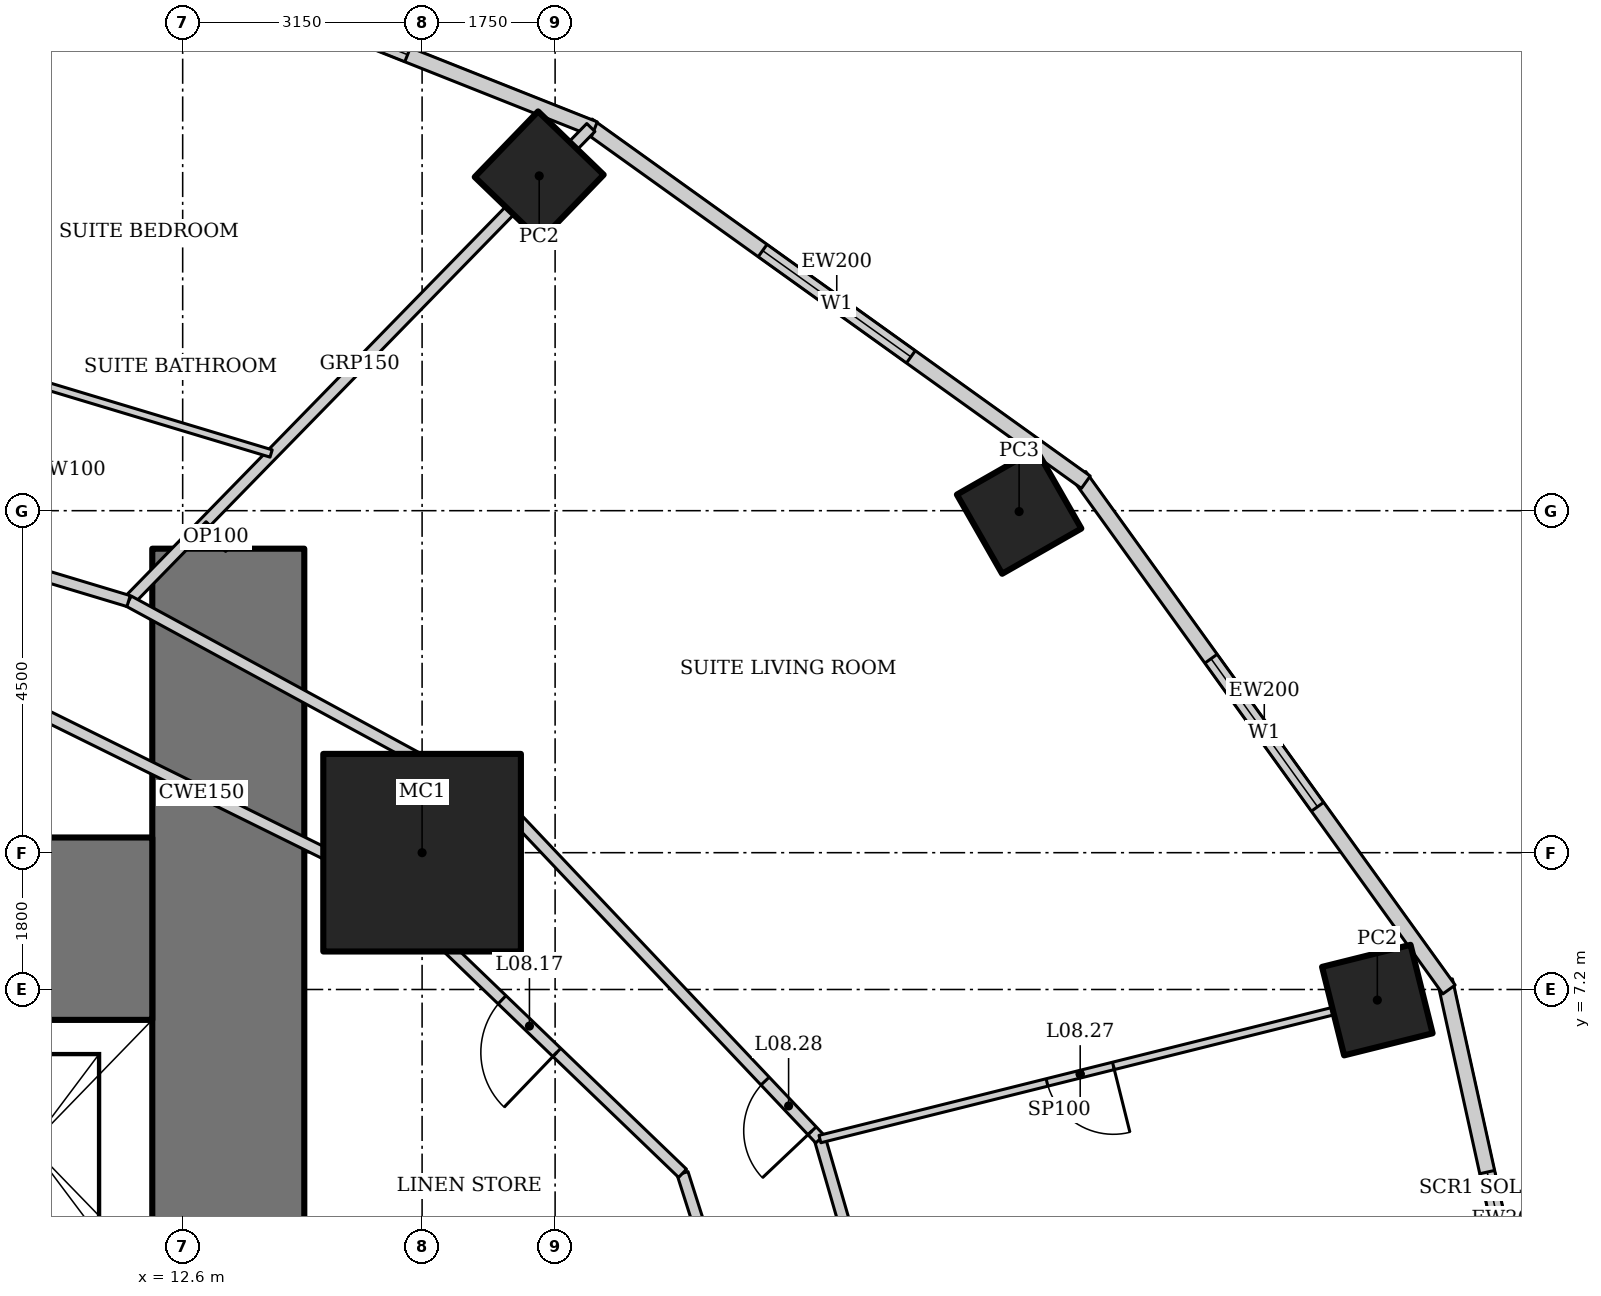
"""IFC4 building model, lengths in metres.
Left out: names, types, materials, properties, quantities, classifications, styles, units other than length and angle.
Written with IfcOpenShell. Run it as: python <this file> out.ifc"""

import sys

from ifc_helpers import new_model, si_unit, direction, frame, frame_2d, origin, origin_2d, place, context, subcontext, project, spatial, rectangle, hollow_rectangle, extrude, element, fill, save


model = new_model("IFC4")
c1 = context("Model", 3, precision=1e-05, world=origin(), true_north=direction((0.0, 1.0)))
c2 = subcontext(c1, "Body", "Model", "MODEL_VIEW")
j1 = project(units=[si_unit("LENGTHUNIT", "METRE"), si_unit("PLANEANGLEUNIT", "RADIAN")], contexts=[c1])
p1 = place(None, origin())
s1 = spatial("IfcSite", under=j1, at=p1, CompositionType="ELEMENT")
p2 = place(p1, origin())
s2 = spatial("IfcBuilding", under=s1, at=p2, CompositionType="ELEMENT")
p3 = place(p2, frame((0.0, 0.0, 44.2)))
s3 = spatial("IfcBuildingStorey", under=s2, at=p3, CompositionType="ELEMENT", Elevation=44.2)
p4 = place(p3, frame((15.75, 9.0, 0.0), z_axis=(0.0, 0.0, 1.0), x_axis=(1.0, 0.0, 0.0)))
e1 = element("IfcColumn", 1, at=p4, inside=s3, PredefinedType="COLUMN", context=c2, shape_type="SweptSolid", body=[
    extrude(hollow_rectangle(XDim=2.6, YDim=2.6, WallThickness=0.13, at=origin_2d()), origin(), (0.0, 0.0, 1.0), 3.6),
])
p5 = place(p3, frame((28.318, 7.06, 0.0), z_axis=(0.0, 0.0, 1.0), x_axis=(0.970295726276, 0.2419218956, 0.0)))
e2 = element("IfcColumn", 2, at=p5, inside=s3, PredefinedType="COLUMN", context=c2, shape_type="SweptSolid", body=[
    extrude(hollow_rectangle(XDim=1.2, YDim=1.2, WallThickness=0.1, at=origin_2d()), origin(), (0.0, 0.0, 1.0), 3.6),
])
p6 = place(p3, frame((23.605, 13.489, 0.0), z_axis=(0.0, 0.0, 1.0), x_axis=(0.86824298017, 0.496139221777, 0.0)))
e3 = element("IfcColumn", 3, at=p6, inside=s3, PredefinedType="COLUMN", context=c2, shape_type="SweptSolid", body=[
    extrude(hollow_rectangle(XDim=1.2, YDim=1.2, WallThickness=0.12, at=origin_2d()), origin(), (0.0, 0.0, 1.0), 3.6),
])
p7 = place(p3, frame((17.291, 17.905, 0.0), z_axis=(0.0, 0.0, 1.0), x_axis=(0.694658370459, 0.719339800339, 0.0)))
e4 = element("IfcColumn", 4, at=p7, inside=s3, PredefinedType="COLUMN", context=c2, shape_type="SweptSolid", body=[
    extrude(hollow_rectangle(XDim=1.2, YDim=1.2, WallThickness=0.1, at=origin_2d()), origin(), (0.0, 0.0, 1.0), 3.6),
])
p8 = place(p3, frame((13.2, -13.0, 0.0), z_axis=(0.0, 0.0, 1.0), x_axis=(0.0, 1.0, 0.0)))
e5 = element("IfcWall", 5, at=p8, inside=s3, PredefinedType="SHEAR", context=c2, shape_type="SweptSolid", body=[
    extrude(rectangle(XDim=26.0, YDim=2.0, at=frame_2d((13.0, 0.0))), origin(), (0.0, 0.0, 1.0), 3.6),
])
p9 = place(p8, frame((12.1, 0.0, 0.0)))
e6 = element("IfcOpeningElement", 6, at=p9, cuts=e5, PredefinedType="OPENING", context=c2, shape_type="SweptSolid", body=[
    extrude(rectangle(XDim=1.8, YDim=2.1, at=frame_2d((0.9, 1.05))), frame((0.0, 1.01, 0.0), z_axis=(0.0, -1.0, 0.0), x_axis=(1.0, 0.0, 0.0)), (0.0, 0.0, 1.0), 2.02),
])
p10 = place(p3, frame((12.2, 8.0, 0.0), z_axis=(0.0, 0.0, 1.0), x_axis=(-1.0, 0.0, 0.0)))
e7 = element("IfcWall", 7, at=p10, inside=s3, PredefinedType="SHEAR", context=c2, shape_type="SweptSolid", body=[
    extrude(rectangle(XDim=24.4, YDim=2.4, at=frame_2d((12.2, 0.0))), origin(), (0.0, 0.0, 1.0), 3.6),
])
p11 = place(p3, frame((30.835, -0.067, 0.0), z_axis=(0.0, 0.0, 1.0), x_axis=(-0.215238065514, 0.976561608478, 0.0)))
e8 = element("IfcWall", 8, at=p11, inside=s3, PredefinedType="SOLIDWALL", context=c2, shape_type="SweptSolid", body=[
    extrude(rectangle(XDim=7.562, YDim=0.2, at=frame_2d((3.781, 0.0))), origin(), (0.0, 0.0, 1.0), 3.45),
])
p12 = place(p11, frame((2.581, 0.0, 0.5)))
e9 = element("IfcOpeningElement", 9, at=p12, cuts=e8, PredefinedType="OPENING", context=c2, shape_type="SweptSolid", body=[
    extrude(rectangle(XDim=2.4, YDim=2.2, at=frame_2d((1.2, 1.1))), frame((0.0, 0.11, 0.0), z_axis=(0.0, -1.0, 0.0), x_axis=(1.0, 0.0, 0.0)), (0.0, 0.0, 1.0), 0.22),
])
p13 = place(p3, frame((29.26, 7.2, 0.0), z_axis=(0.0, 0.0, 1.0), x_axis=(-0.583937613703, 0.811798536155, 0.0)))
e10 = element("IfcWall", 10, at=p13, inside=s3, PredefinedType="SOLIDWALL", context=c2, shape_type="SweptSolid", body=[
    extrude(rectangle(XDim=8.323, YDim=0.2, at=frame_2d((4.162, 0.0))), origin(), (0.0, 0.0, 1.0), 3.45),
])
p14 = place(p13, frame((2.961, 0.0, 0.5)))
e11 = element("IfcOpeningElement", 11, at=p14, cuts=e10, PredefinedType="OPENING", context=c2, shape_type="SweptSolid", body=[
    extrude(rectangle(XDim=2.4, YDim=2.2, at=frame_2d((1.2, 1.1))), frame((0.0, 0.11, 0.0), z_axis=(0.0, -1.0, 0.0), x_axis=(1.0, 0.0, 0.0)), (0.0, 0.0, 1.0), 0.22),
])
p15 = place(p3, frame((24.482, 13.875, 0.0), z_axis=(0.0, 0.0, 1.0), x_axis=(-0.812791321576, 0.582554948112, 0.0)))
e12 = element("IfcWall", 12, at=p15, inside=s3, PredefinedType="SOLIDWALL", context=c2, shape_type="SweptSolid", body=[
    extrude(rectangle(XDim=8.063, YDim=0.2, at=frame_2d((4.032, 0.0))), origin(), (0.0, 0.0, 1.0), 3.45),
])
p16 = place(p15, frame((2.832, 0.0, 0.5)))
e13 = element("IfcOpeningElement", 13, at=p16, cuts=e12, PredefinedType="OPENING", context=c2, shape_type="SweptSolid", body=[
    extrude(rectangle(XDim=2.4, YDim=2.2, at=frame_2d((1.2, 1.1))), frame((0.0, 0.11, 0.0), z_axis=(0.0, -1.0, 0.0), x_axis=(1.0, 0.0, 0.0)), (0.0, 0.0, 1.0), 0.22),
])
p17 = place(p3, frame((18.018, 18.523, 0.0), z_axis=(0.0, 0.0, 1.0), x_axis=(-0.929358351251, 0.369178892895, 0.0)))
e14 = element("IfcWall", 14, at=p17, inside=s3, PredefinedType="SOLIDWALL", context=c2, shape_type="SweptSolid", body=[
    extrude(rectangle(XDim=7.692, YDim=0.2, at=frame_2d((3.846, 0.0))), origin(), (0.0, 0.0, 1.0), 3.45),
])
p18 = place(p17, frame((2.646, 0.0, 0.5)))
e15 = element("IfcOpeningElement", 15, at=p18, cuts=e14, PredefinedType="OPENING", context=c2, shape_type="SweptSolid", body=[
    extrude(rectangle(XDim=2.4, YDim=2.2, at=frame_2d((1.2, 1.1))), frame((0.0, 0.11, 0.0), z_axis=(0.0, -1.0, 0.0), x_axis=(1.0, 0.0, 0.0)), (0.0, 0.0, 1.0), 0.22),
])
p19 = place(p3, frame((17.97, 18.542, 0.0), z_axis=(0.0, 0.0, 1.0), x_axis=(-0.698503223934, -0.715606907564, 0.0)))
e16 = element("IfcWall", 16, at=p19, inside=s3, PredefinedType="PARTITIONING", context=c2, shape_type="SweptSolid", body=[
    extrude(rectangle(XDim=8.707, YDim=0.15, at=frame_2d((4.354, 0.0))), origin(), (0.0, 0.0, 1.0), 2.528),
])
p20 = place(p3, frame((22.5, 0.0, 0.0), z_axis=(0.0, 0.0, 1.0), x_axis=(-0.278247435376, 0.960509429785, 0.0)))
e17 = element("IfcWall", 17, at=p20, inside=s3, PredefinedType="PARTITIONING", context=c2, shape_type="SweptSolid", body=[
    extrude(rectangle(XDim=5.447, YDim=0.15, at=frame_2d((2.724, 0.0))), origin(), (0.0, 0.0, 1.0), 3.45),
])
p21 = place(p3, frame((20.984, 5.232, 0.0), z_axis=(0.0, 0.0, 1.0), x_axis=(-0.687062608696, 0.726598218916, 0.0)))
e18 = element("IfcWall", 18, at=p21, inside=s3, PredefinedType="PARTITIONING", context=c2, shape_type="SweptSolid", body=[
    extrude(rectangle(XDim=6.039, YDim=0.15, at=frame_2d((3.02, 0.0))), origin(), (0.0, 0.0, 1.0), 3.45),
])
p22 = place(p21, frame((0.15, 0.0, 0.0)))
e19 = element("IfcOpeningElement", 19, at=p22, cuts=e18, PredefinedType="OPENING", context=c2, shape_type="SweptSolid", body=[
    extrude(rectangle(XDim=0.9, YDim=2.1, at=frame_2d((0.45, 1.05))), frame((0.0, 0.085, 0.0), z_axis=(0.0, -1.0, 0.0), x_axis=(1.0, 0.0, 0.0)), (0.0, 0.0, 1.0), 0.17),
])
p23 = place(p3, frame((16.835, 9.62, 0.0), z_axis=(0.0, 0.0, 1.0), x_axis=(-0.878450059298, 0.477834169267, 0.0)))
e20 = element("IfcWall", 20, at=p23, inside=s3, PredefinedType="PARTITIONING", context=c2, shape_type="SweptSolid", body=[
    extrude(rectangle(XDim=5.631, YDim=0.15, at=frame_2d((2.815, 0.0))), origin(), (0.0, 0.0, 1.0), 3.45),
])
p24 = place(p3, frame((11.888, 12.311, 0.0), z_axis=(0.0, 0.0, 1.0), x_axis=(-0.957564241242, 0.288219922793, 0.0)))
e21 = element("IfcWall", 21, at=p24, inside=s3, PredefinedType="PARTITIONING", context=c2, shape_type="SweptSolid", body=[
    extrude(rectangle(XDim=5.085, YDim=0.15, at=frame_2d((2.542, 0.0))), origin(), (0.0, 0.0, 1.0), 3.45),
])
p25 = place(p3, frame((20.413, 0.9, 0.0), z_axis=(0.0, 0.0, 1.0), x_axis=(-0.303505448228, 0.952829702988, 0.0)))
e22 = element("IfcWall", 22, at=p25, inside=s3, PredefinedType="PARTITIONING", context=c2, shape_type="SweptSolid", body=[
    extrude(rectangle(XDim=4.073, YDim=0.15, at=frame_2d((2.037, 0.0))), origin(), (0.0, 0.0, 1.0), 3.45),
])
p26 = place(p3, frame((19.177, 4.781, 0.0), z_axis=(0.0, 0.0, 1.0), x_axis=(-0.720837261072, 0.693104352209, 0.0)))
e23 = element("IfcWall", 23, at=p26, inside=s3, PredefinedType="PARTITIONING", context=c2, shape_type="SweptSolid", body=[
    extrude(rectangle(XDim=5.59, YDim=0.15, at=frame_2d((2.795, 0.0))), origin(), (0.0, 0.0, 1.0), 3.45),
])
p27 = place(p26, frame((2.295, 0.0, 0.0)))
e24 = element("IfcOpeningElement", 24, at=p27, cuts=e23, PredefinedType="OPENING", context=c2, shape_type="SweptSolid", body=[
    extrude(rectangle(XDim=1.0, YDim=2.1, at=frame_2d((0.5, 1.05))), frame((0.0, 0.085, 0.0), z_axis=(0.0, -1.0, 0.0), x_axis=(1.0, 0.0, 0.0)), (0.0, 0.0, 1.0), 0.17),
])
p28 = place(p3, frame((15.147, 8.656, 0.0), z_axis=(0.0, 0.0, 1.0), x_axis=(-0.89656943448, 0.442903205177, 0.0)))
e25 = element("IfcWall", 25, at=p28, inside=s3, PredefinedType="PARTITIONING", context=c2, shape_type="SweptSolid", body=[
    extrude(rectangle(XDim=5.126, YDim=0.15, at=frame_2d((2.563, 0.0))), origin(), (0.0, 0.0, 1.0), 3.45),
])
p29 = place(p3, frame((27.833, 6.939, 0.0), z_axis=(0.0, 0.0, 1.0), x_axis=(-0.970294912749, -0.241925158453, 0.0)))
e26 = element("IfcWall", 26, at=p29, inside=s3, PredefinedType="PARTITIONING", context=c2, shape_type="SweptSolid", body=[
    extrude(rectangle(XDim=7.058, YDim=0.1, at=frame_2d((3.529, 0.0))), origin(), (0.0, 0.0, 1.0), 2.333),
])
p30 = place(p29, frame((3.079, 0.0, 0.0)))
e27 = element("IfcOpeningElement", 27, at=p30, cuts=e26, PredefinedType="OPENING", context=c2, shape_type="SweptSolid", body=[
    extrude(rectangle(XDim=0.9, YDim=2.1, at=frame_2d((0.45, 1.05))), frame((0.0, 0.06, 0.0), z_axis=(0.0, -1.0, 0.0), x_axis=(1.0, 0.0, 0.0)), (0.0, 0.0, 1.0), 0.12),
])
p31 = place(p3, frame((10.665, 15.185, 0.0), z_axis=(0.0, 0.0, 1.0), x_axis=(0.957568413147, -0.288206061946, 0.0)))
e28 = element("IfcWall", 28, at=p31, inside=s3, PredefinedType="PARTITIONING", context=c2, shape_type="SweptSolid", body=[
    extrude(rectangle(XDim=3.236, YDim=0.1, at=frame_2d((1.618, 0.0))), origin(), (0.0, 0.0, 1.0), 3.45),
])
p32 = place(p3, frame((13.2, 13.0, 0.0), z_axis=(0.0, 0.0, 1.0), x_axis=(-0.715599628005, 0.698510681664, 0.0)))
e29 = element("IfcWall", 29, at=p32, inside=s3, PredefinedType="PARTITIONING", context=c2, shape_type="SweptSolid", body=[
    extrude(rectangle(XDim=0.457, YDim=0.1, at=frame_2d((0.229, 0.0))), origin(), (0.0, 0.0, 1.0), 3.45),
])
p33 = place(p12, origin())
e30 = element("IfcWindow", 30, at=p33, inside=s3, PartitioningType="SINGLE_PANEL", PredefinedType="WINDOW", context=c2, shape_type="SweptSolid", body=[
    extrude(rectangle(XDim=2.4, YDim=2.2, at=frame_2d((1.2, 1.1))), frame((0.0, 0.03, 0.0), z_axis=(0.0, -1.0, 0.0), x_axis=(1.0, 0.0, 0.0)), (0.0, 0.0, 1.0), 0.06),
])
fill(e9, e30)
p34 = place(p14, origin())
e31 = element("IfcWindow", 31, at=p34, inside=s3, PartitioningType="SINGLE_PANEL", PredefinedType="WINDOW", context=c2, shape_type="SweptSolid", body=[
    extrude(rectangle(XDim=2.4, YDim=2.2, at=frame_2d((1.2, 1.1))), frame((0.0, 0.03, 0.0), z_axis=(0.0, -1.0, 0.0), x_axis=(1.0, 0.0, 0.0)), (0.0, 0.0, 1.0), 0.06),
])
fill(e11, e31)
p35 = place(p16, origin())
e32 = element("IfcWindow", 32, at=p35, inside=s3, PartitioningType="SINGLE_PANEL", PredefinedType="WINDOW", context=c2, shape_type="SweptSolid", body=[
    extrude(rectangle(XDim=2.4, YDim=2.2, at=frame_2d((1.2, 1.1))), frame((0.0, 0.03, 0.0), z_axis=(0.0, -1.0, 0.0), x_axis=(1.0, 0.0, 0.0)), (0.0, 0.0, 1.0), 0.06),
])
fill(e13, e32)
p36 = place(p18, origin())
e33 = element("IfcWindow", 33, at=p36, inside=s3, PartitioningType="SINGLE_PANEL", PredefinedType="WINDOW", context=c2, shape_type="SweptSolid", body=[
    extrude(rectangle(XDim=2.4, YDim=2.2, at=frame_2d((1.2, 1.1))), frame((0.0, 0.03, 0.0), z_axis=(0.0, -1.0, 0.0), x_axis=(1.0, 0.0, 0.0)), (0.0, 0.0, 1.0), 0.06),
])
fill(e15, e33)
p37 = place(p27, origin())
e34 = element("IfcDoor", 34, at=p37, inside=s3, OperationType="SINGLE_SWING_LEFT", PredefinedType="DOOR", context=c2, shape_type="SweptSolid", body=[
    extrude(rectangle(XDim=1.0, YDim=2.1, at=frame_2d((0.5, 1.05))), frame((0.0, 0.025, 0.0), z_axis=(0.0, -1.0, 0.0), x_axis=(1.0, 0.0, 0.0)), (0.0, 0.0, 1.0), 0.05),
])
fill(e24, e34)
p38 = place(p30, origin())
e35 = element("IfcDoor", 35, at=p38, inside=s3, OperationType="SINGLE_SWING_LEFT", PredefinedType="DOOR", context=c2, shape_type="SweptSolid", body=[
    extrude(rectangle(XDim=0.9, YDim=2.1, at=frame_2d((0.45, 1.05))), frame((0.0, 0.025, 0.0), z_axis=(0.0, -1.0, 0.0), x_axis=(1.0, 0.0, 0.0)), (0.0, 0.0, 1.0), 0.05),
])
fill(e27, e35)
p39 = place(p22, origin())
e36 = element("IfcDoor", 36, at=p39, inside=s3, OperationType="SINGLE_SWING_LEFT", PredefinedType="DOOR", context=c2, shape_type="SweptSolid", body=[
    extrude(rectangle(XDim=0.9, YDim=2.1, at=frame_2d((0.45, 1.05))), frame((0.0, 0.025, 0.0), z_axis=(0.0, -1.0, 0.0), x_axis=(1.0, 0.0, 0.0)), (0.0, 0.0, 1.0), 0.05),
])
fill(e19, e36)
save(model, sys.argv[1])
